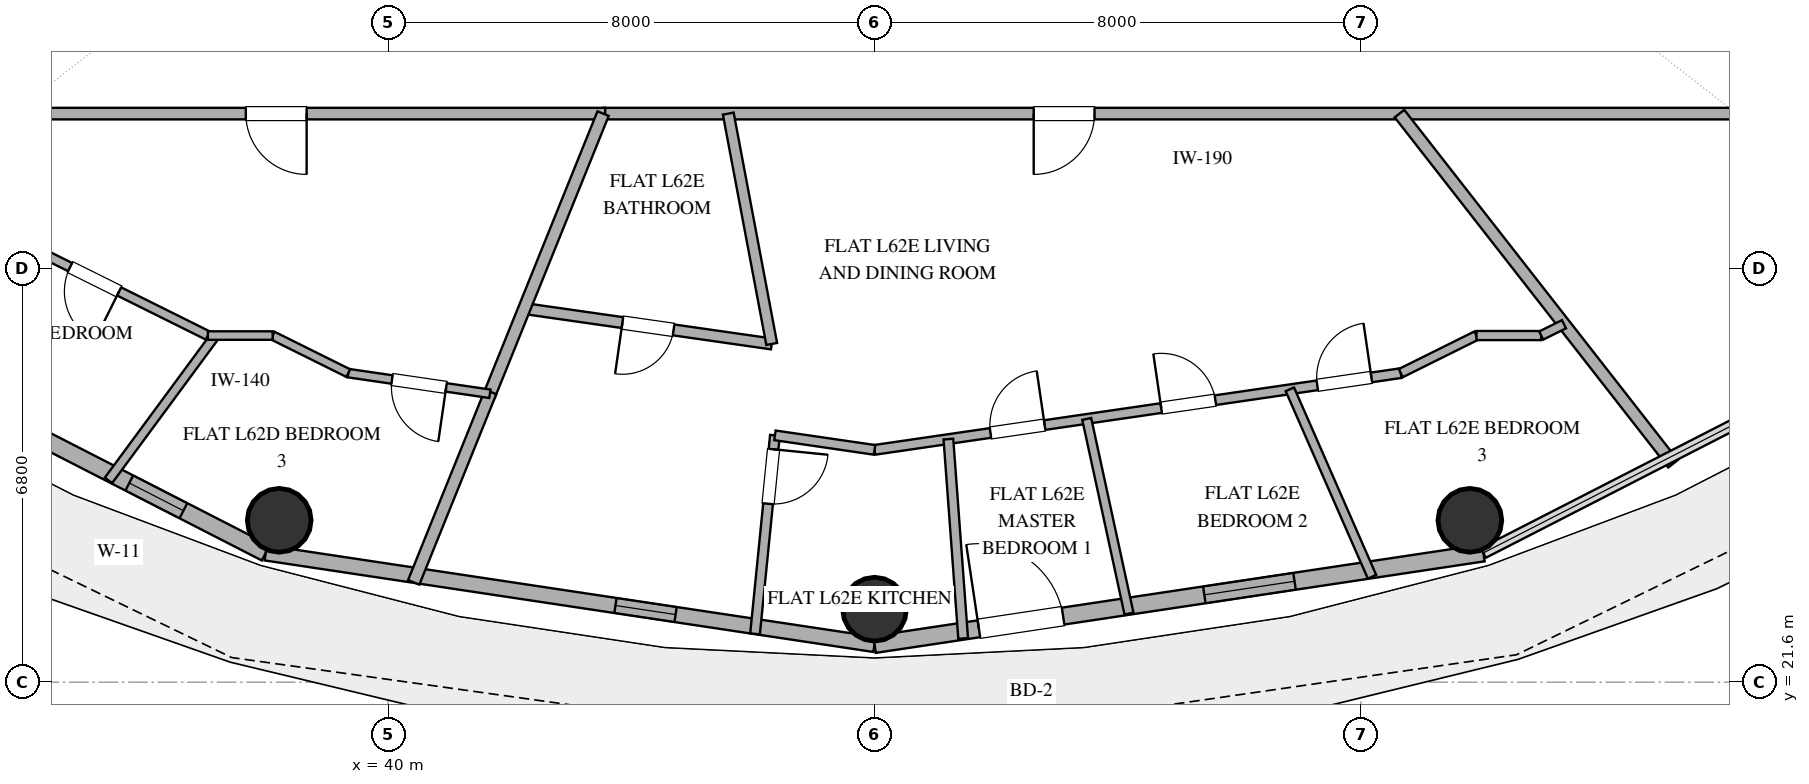
"""IFC4 building model, lengths in metres.
Left out: names, types, materials, properties, quantities, classifications, styles, units other than length and angle.
Written with IfcOpenShell. Run it as: python <this file> out.ifc"""

import sys

from ifc_helpers import new_model, si_unit, direction, frame, frame_2d, origin, origin_2d, place, context, subcontext, project, spatial, rectangle, hollow_circle, extrude, element, fill, save


model = new_model("IFC4")
c1 = context("Model", 3, precision=1e-05, world=origin(), true_north=direction((0.0, 1.0)))
c2 = subcontext(c1, "Body", "Model", "MODEL_VIEW")
j1 = project(units=[si_unit("LENGTHUNIT", "METRE"), si_unit("PLANEANGLEUNIT", "RADIAN")], contexts=[c1])
p1 = place(None, origin())
s1 = spatial("IfcSite", under=j1, at=p1, CompositionType="ELEMENT")
p2 = place(p1, origin())
s2 = spatial("IfcBuilding", under=s1, at=p2, CompositionType="ELEMENT")
p3 = place(p2, frame((0.0, 0.0, 242.4)))
s3 = spatial("IfcBuildingStorey", under=s2, at=p3, CompositionType="ELEMENT", Elevation=242.4)
for number, where, z_axis, x_axis in (
    (1, (38.209, 24.261, 0.0), (0.0, 0.0, 1.0), (1.0, 0.0, 0.0)),
    (2, (48.0, 22.8, 0.0), (0.0, 0.0, 1.0), (1.0, 0.0, 0.0)),
    (3, (57.791, 24.261, 0.0), (0.0, 0.0, 1.0), (1.0, 0.0, 0.0)),
):
    element("IfcColumn", number, at=place(p3, frame(where, z_axis=z_axis, x_axis=x_axis)), inside=s3, PredefinedType="COLUMN", context=c2, shape_type="SweptSolid", body=[
        extrude(hollow_circle(Radius=0.525, WallThickness=0.028, at=origin_2d()), origin(), (0.0, 0.0, 1.0), 3.36),
    ])
p4 = place(p3, frame((29.617, 28.013, 0.0), z_axis=(0.0, 0.0, 1.0), x_axis=(0.890007394051, -0.455946091699, 0.0)))
e4 = element("IfcWall", 4, at=p4, inside=s3, PredefinedType="SOLIDWALL", context=c2, shape_type="SweptSolid", body=[
    extrude(rectangle(XDim=9.404, YDim=0.28, at=frame_2d((4.702, 0.0))), origin(), (0.0, 0.0, 1.0), 3.36),
])
p5 = place(p4, frame((3.224, 0.0, 0.85)))
e5 = element("IfcOpeningElement", 5, at=p5, cuts=e4, PredefinedType="OPENING", context=c2, shape_type="SweptSolid", body=[
    extrude(rectangle(XDim=1.8, YDim=2.2, at=frame_2d((0.9, 1.1))), frame((0.0, 0.15, 0.0), z_axis=(0.0, -1.0, 0.0), x_axis=(1.0, 0.0, 0.0)), (0.0, 0.0, 1.0), 0.3),
])
p6 = place(p4, frame((6.883, 0.0, 0.85)))
e6 = element("IfcOpeningElement", 6, at=p6, cuts=e4, PredefinedType="OPENING", context=c2, shape_type="SweptSolid", body=[
    extrude(rectangle(XDim=1.0, YDim=1.8, at=frame_2d((0.5, 0.9))), frame((0.0, 0.15, 0.0), z_axis=(0.0, -1.0, 0.0), x_axis=(1.0, 0.0, 0.0)), (0.0, 0.0, 1.0), 0.3),
])
p7 = place(p3, frame((37.987, 23.726, 0.0), z_axis=(0.0, 0.0, 1.0), x_axis=(0.988882522213, -0.148698881169, 0.0)))
e7 = element("IfcWall", 7, at=p7, inside=s3, PredefinedType="SOLIDWALL", context=c2, shape_type="SweptSolid", body=[
    extrude(rectangle(XDim=10.125, YDim=0.25, at=frame_2d((5.062, 0.0))), origin(), (0.0, 0.0, 1.0), 3.36),
])
p8 = place(p7, frame((5.816, 0.0, 0.35)))
e8 = element("IfcOpeningElement", 8, at=p8, cuts=e7, PredefinedType="OPENING", context=c2, shape_type="SweptSolid", body=[
    extrude(rectangle(XDim=1.0, YDim=1.05, at=frame_2d((0.5, 0.525))), frame((0.0, 0.135, 0.0), z_axis=(0.0, -1.0, 0.0), x_axis=(1.0, 0.0, 0.0)), (0.0, 0.0, 1.0), 0.27),
])
p9 = place(p3, frame((48.0, 22.22, 0.0), z_axis=(0.0, 0.0, 1.0), x_axis=(0.988882522213, 0.148698881169, 0.0)))
e9 = element("IfcWall", 9, at=p9, inside=s3, PredefinedType="SOLIDWALL", context=c2, shape_type="SweptSolid", body=[
    extrude(rectangle(XDim=10.125, YDim=0.28, at=frame_2d((5.062, 0.0))), origin(), (0.0, 0.0, 1.0), 3.36),
])
p10 = place(p9, frame((1.736, 0.0, 0.0)))
e10 = element("IfcOpeningElement", 10, at=p10, cuts=e9, PredefinedType="OPENING", context=c2, shape_type="SweptSolid", body=[
    extrude(rectangle(XDim=1.4, YDim=2.2, at=frame_2d((0.7, 1.1))), frame((0.0, 0.15, 0.0), z_axis=(0.0, -1.0, 0.0), x_axis=(1.0, 0.0, 0.0)), (0.0, 0.0, 1.0), 0.3),
])
p11 = place(p9, frame((5.485, 0.0, 0.85)))
e11 = element("IfcOpeningElement", 11, at=p11, cuts=e9, PredefinedType="OPENING", context=c2, shape_type="SweptSolid", body=[
    extrude(rectangle(XDim=1.5, YDim=1.8, at=frame_2d((0.75, 0.9))), frame((0.0, 0.15, 0.0), z_axis=(0.0, -1.0, 0.0), x_axis=(1.0, 0.0, 0.0)), (0.0, 0.0, 1.0), 0.3),
])
p12 = place(p3, frame((63.25, 30.95, 0.0), z_axis=(0.0, 0.0, 1.0), x_axis=(-1.0, 0.0, 0.0)))
e12 = element("IfcWall", 12, at=p12, inside=s3, PredefinedType="PARTITIONING", context=c2, shape_type="SweptSolid", body=[
    extrude(rectangle(XDim=19.715, YDim=0.19, at=frame_2d((9.857, 0.0))), origin(), (0.0, 0.0, 1.0), 2.72),
])
p13 = place(p12, frame((11.632, 0.0, 0.0)))
e13 = element("IfcOpeningElement", 13, at=p13, cuts=e12, PredefinedType="OPENING", context=c2, shape_type="SweptSolid", body=[
    extrude(rectangle(XDim=1.0, YDim=2.2, at=frame_2d((0.5, 1.1))), frame((0.0, 0.105, 0.0), z_axis=(0.0, -1.0, 0.0), x_axis=(1.0, 0.0, 0.0)), (0.0, 0.0, 1.0), 0.21),
])
p14 = place(p3, frame((43.57, 30.95, 0.0), z_axis=(0.0, 0.0, 1.0), x_axis=(-1.0, 0.0, 0.0)))
e14 = element("IfcWall", 14, at=p14, inside=s3, PredefinedType="PARTITIONING", context=c2, shape_type="SweptSolid", body=[
    extrude(rectangle(XDim=10.82, YDim=0.19, at=frame_2d((5.41, 0.0))), origin(), (0.0, 0.0, 1.0), 2.72),
])
p15 = place(p14, frame((4.91, 0.0, 0.0)))
e15 = element("IfcOpeningElement", 15, at=p15, cuts=e14, PredefinedType="OPENING", context=c2, shape_type="SweptSolid", body=[
    extrude(rectangle(XDim=1.0, YDim=2.2, at=frame_2d((0.5, 1.1))), frame((0.0, 0.105, 0.0), z_axis=(0.0, -1.0, 0.0), x_axis=(1.0, 0.0, 0.0)), (0.0, 0.0, 1.0), 0.21),
])
p16 = place(p3, frame((56.633, 30.95, 0.0), z_axis=(0.0, 0.0, 1.0), x_axis=(0.615657656631, -0.788013737083, 0.0)))
e16 = element("IfcWall", 16, at=p16, inside=s3, PredefinedType="PARTITIONING", context=c2, shape_type="SweptSolid", body=[
    extrude(rectangle(XDim=7.308, YDim=0.2, at=frame_2d((3.654, 0.0))), origin(), (0.0, 0.0, 1.0), 2.72),
])
p17 = place(p3, frame((37.036, 27.3, 0.0), z_axis=(0.0, 0.0, 1.0), x_axis=(-0.895471406875, 0.445119039661, 0.0)))
e17 = element("IfcWall", 17, at=p17, inside=s3, PredefinedType="PARTITIONING", context=c2, shape_type="SweptSolid", body=[
    extrude(rectangle(XDim=5.971, YDim=0.15, at=frame_2d((2.986, 0.0))), origin(), (0.0, 0.0, 1.0), 2.72),
])
p18 = place(p17, frame((1.631, 0.0, 0.0)))
e18 = element("IfcOpeningElement", 18, at=p18, cuts=e17, PredefinedType="OPENING", context=c2, shape_type="SweptSolid", body=[
    extrude(rectangle(XDim=0.9, YDim=2.1, at=frame_2d((0.45, 1.05))), frame((0.0, 0.085, 0.0), z_axis=(0.0, -1.0, 0.0), x_axis=(1.0, 0.0, 0.0)), (0.0, 0.0, 1.0), 0.17),
])
p19 = place(p17, frame((4.582, 0.0, 0.0)))
e19 = element("IfcOpeningElement", 19, at=p19, cuts=e17, PredefinedType="OPENING", context=c2, shape_type="SweptSolid", body=[
    extrude(rectangle(XDim=0.9, YDim=2.1, at=frame_2d((0.45, 1.05))), frame((0.0, 0.085, 0.0), z_axis=(0.0, -1.0, 0.0), x_axis=(1.0, 0.0, 0.0)), (0.0, 0.0, 1.0), 0.17),
])
p20 = place(p3, frame((46.309, 27.162, 0.0), z_axis=(0.0, 0.0, 1.0), x_axis=(-0.989929285776, 0.141562739319, 0.0)))
e20 = element("IfcWall", 20, at=p20, inside=s3, PredefinedType="PLUMBINGWALL", context=c2, shape_type="SweptSolid", body=[
    extrude(rectangle(XDim=4.11, YDim=0.18, at=frame_2d((2.055, 0.0))), origin(), (0.0, 0.0, 1.0), 2.72),
])
p21 = place(p20, frame((1.63, 0.0, 0.0)))
e21 = element("IfcOpeningElement", 21, at=p21, cuts=e20, PredefinedType="OPENING", context=c2, shape_type="SweptSolid", body=[
    extrude(rectangle(XDim=0.85, YDim=2.1, at=frame_2d((0.425, 1.05))), frame((0.0, 0.1, 0.0), z_axis=(0.0, -1.0, 0.0), x_axis=(1.0, 0.0, 0.0)), (0.0, 0.0, 1.0), 0.2),
])
p22 = place(p3, frame((45.594, 30.95, 0.0), z_axis=(0.0, 0.0, 1.0), x_axis=(0.18532477331, -0.982677326694, 0.0)))
e22 = element("IfcWall", 22, at=p22, inside=s3, PredefinedType="PLUMBINGWALL", context=c2, shape_type="SweptSolid", body=[
    extrude(rectangle(XDim=3.854, YDim=0.18, at=frame_2d((1.927, 0.0))), origin(), (0.0, 0.0, 1.0), 2.72),
])
p23 = place(p3, frame((43.535, 30.95, 0.0), z_axis=(0.0, 0.0, 1.0), x_axis=(-0.374594584492, -0.927188706397, 0.0)))
e23 = element("IfcWall", 23, at=p23, inside=s3, PredefinedType="PARTITIONING", context=c2, shape_type="SweptSolid", body=[
    extrude(rectangle(XDim=5.002, YDim=0.2, at=frame_2d((2.501, 0.0))), origin(), (0.0, 0.0, 1.0), 2.72),
])
p24 = place(p3, frame((40.421, 23.242, 0.0), z_axis=(0.0, 0.0, 1.0), x_axis=(0.374604084458, 0.927184868248, 0.0)))
e24 = element("IfcWall", 24, at=p24, inside=s3, PredefinedType="PARTITIONING", context=c2, shape_type="SweptSolid", body=[
    extrude(rectangle(XDim=3.377, YDim=0.2, at=frame_2d((1.688, 0.0))), origin(), (0.0, 0.0, 1.0), 2.72),
])
p25 = place(p3, frame((48.0, 25.42, 0.0), z_axis=(0.0, 0.0, 1.0), x_axis=(0.989540121389, 0.144257922351, 0.0)))
e25 = element("IfcWall", 25, at=p25, inside=s3, PredefinedType="PLUMBINGWALL", context=c2, shape_type="SweptSolid", body=[
    extrude(rectangle(XDim=8.746, YDim=0.16, at=frame_2d((4.373, 0.0))), origin(), (0.0, 0.0, 1.0), 2.72),
])
p26 = place(p25, frame((4.765, 0.0, 0.0)))
e26 = element("IfcOpeningElement", 26, at=p26, cuts=e25, PredefinedType="OPENING", context=c2, shape_type="SweptSolid", body=[
    extrude(rectangle(XDim=0.9, YDim=2.1, at=frame_2d((0.45, 1.05))), frame((0.0, 0.09, 0.0), z_axis=(0.0, -1.0, 0.0), x_axis=(1.0, 0.0, 0.0)), (0.0, 0.0, 1.0), 0.18),
])
p27 = place(p25, frame((1.927, 0.0, 0.0)))
e27 = element("IfcOpeningElement", 27, at=p27, cuts=e25, PredefinedType="OPENING", context=c2, shape_type="SweptSolid", body=[
    extrude(rectangle(XDim=0.9, YDim=2.1, at=frame_2d((0.45, 1.05))), frame((0.0, 0.09, 0.0), z_axis=(0.0, -1.0, 0.0), x_axis=(1.0, 0.0, 0.0)), (0.0, 0.0, 1.0), 0.18),
])
p28 = place(p25, frame((7.358, 0.0, 0.0)))
e28 = element("IfcOpeningElement", 28, at=p28, cuts=e25, PredefinedType="OPENING", context=c2, shape_type="SweptSolid", body=[
    extrude(rectangle(XDim=0.9, YDim=2.1, at=frame_2d((0.45, 1.05))), frame((0.0, 0.09, 0.0), z_axis=(0.0, -1.0, 0.0), x_axis=(1.0, 0.0, 0.0)), (0.0, 0.0, 1.0), 0.18),
])
p29 = place(p3, frame((54.831, 26.416, 0.0), z_axis=(0.0, 0.0, 1.0), x_axis=(0.401469388376, -0.915872442099, 0.0)))
e29 = element("IfcWall", 29, at=p29, inside=s3, PredefinedType="PARTITIONING", context=c2, shape_type="SweptSolid", body=[
    extrude(rectangle(XDim=3.366, YDim=0.15, at=frame_2d((1.683, 0.0))), origin(), (0.0, 0.0, 1.0), 2.72),
])
p30 = place(p3, frame((49.458, 22.318, 0.0), z_axis=(0.0, 0.0, 1.0), x_axis=(-0.073879890619, 0.997267146637, 0.0)))
e30 = element("IfcWall", 30, at=p30, inside=s3, PredefinedType="PLUMBINGWALL", context=c2, shape_type="SweptSolid", body=[
    extrude(rectangle(XDim=3.288, YDim=0.16, at=frame_2d((1.644, 0.0))), origin(), (0.0, 0.0, 1.0), 2.72),
])
p31 = place(p3, frame((46.362, 25.659, 0.0), z_axis=(0.0, 0.0, 1.0), x_axis=(-0.099783673114, -0.995009155023, 0.0)))
e31 = element("IfcWall", 31, at=p31, inside=s3, PredefinedType="PLUMBINGWALL", context=c2, shape_type="SweptSolid", body=[
    extrude(rectangle(XDim=3.281, YDim=0.16, at=frame_2d((1.641, 0.0))), origin(), (0.0, 0.0, 1.0), 2.72),
])
p32 = place(p31, frame((0.23, 0.0, 0.0)))
e32 = element("IfcOpeningElement", 32, at=p32, cuts=e31, PredefinedType="OPENING", context=c2, shape_type="SweptSolid", body=[
    extrude(rectangle(XDim=0.9, YDim=2.1, at=frame_2d((0.45, 1.05))), frame((0.0, 0.09, 0.0), z_axis=(0.0, -1.0, 0.0), x_axis=(1.0, 0.0, 0.0)), (0.0, 0.0, 1.0), 0.18),
])
p33 = place(p3, frame((52.185, 22.728, 0.0), z_axis=(0.0, 0.0, 1.0), x_axis=(-0.212200652442, 0.977226116671, 0.0)))
e33 = element("IfcWall", 33, at=p33, inside=s3, PredefinedType="PARTITIONING", context=c2, shape_type="SweptSolid", body=[
    extrude(rectangle(XDim=3.276, YDim=0.15, at=frame_2d((1.638, 0.0))), origin(), (0.0, 0.0, 1.0), 2.72),
])
p34 = place(p3, frame((35.401, 24.918, 0.0), z_axis=(0.0, 0.0, 1.0), x_axis=(0.593567519028, 0.804784194897, 0.0)))
e34 = element("IfcWall", 34, at=p34, inside=s3, PredefinedType="PARTITIONING", context=c2, shape_type="SweptSolid", body=[
    extrude(rectangle(XDim=2.96, YDim=0.15, at=frame_2d((1.48, 0.0))), origin(), (0.0, 0.0, 1.0), 2.72),
])
p35 = place(p3, frame((41.674, 26.343, 0.0), z_axis=(0.0, 0.0, 1.0), x_axis=(-0.989532363779, 0.144311125814, 0.0)))
e35 = element("IfcWall", 35, at=p35, inside=s3, PredefinedType="PARTITIONING", context=c2, shape_type="SweptSolid", body=[
    extrude(rectangle(XDim=2.353, YDim=0.14, at=frame_2d((1.177, 0.0))), origin(), (0.0, 0.0, 1.0), 2.72),
])
p36 = place(p35, frame((0.727, 0.0, 0.0)))
e36 = element("IfcOpeningElement", 36, at=p36, cuts=e35, PredefinedType="OPENING", context=c2, shape_type="SweptSolid", body=[
    extrude(rectangle(XDim=0.9, YDim=2.1, at=frame_2d((0.45, 1.05))), frame((0.0, 0.08, 0.0), z_axis=(0.0, -1.0, 0.0), x_axis=(1.0, 0.0, 0.0)), (0.0, 0.0, 1.0), 0.16),
])
p37 = place(p3, frame((48.0, 25.42, 0.0), z_axis=(0.0, 0.0, 1.0), x_axis=(-0.989523327183, 0.144373075605, 0.0)))
e37 = element("IfcWall", 37, at=p37, inside=s3, PredefinedType="PLUMBINGWALL", context=c2, shape_type="SweptSolid", body=[
    extrude(rectangle(XDim=1.656, YDim=0.16, at=frame_2d((0.828, 0.0))), origin(), (0.0, 0.0, 1.0), 2.72),
])
p38 = place(p3, frame((39.345, 26.682, 0.0), z_axis=(0.0, 0.0, 1.0), x_axis=(-0.895584310315, 0.444891833053, 0.0)))
e38 = element("IfcWall", 38, at=p38, inside=s3, PredefinedType="PARTITIONING", context=c2, shape_type="SweptSolid", body=[
    extrude(rectangle(XDim=1.389, YDim=0.14, at=frame_2d((0.694, 0.0))), origin(), (0.0, 0.0, 1.0), 2.72),
])
p39 = place(p3, frame((57.899, 27.3, 0.0), z_axis=(0.0, 0.0, 1.0), x_axis=(-0.895584310315, -0.444891833053, 0.0)))
e39 = element("IfcWall", 39, at=p39, inside=s3, PredefinedType="PARTITIONING", context=c2, shape_type="SweptSolid", body=[
    extrude(rectangle(XDim=1.389, YDim=0.15, at=frame_2d((0.694, 0.0))), origin(), (0.0, 0.0, 1.0), 2.72),
])
p40 = place(p3, frame((58.964, 27.3, 0.0), z_axis=(0.0, 0.0, 1.0), x_axis=(-1.0, 0.0, 0.0)))
e40 = element("IfcWall", 40, at=p40, inside=s3, PredefinedType="PARTITIONING", context=c2, shape_type="SweptSolid", body=[
    extrude(rectangle(XDim=1.065, YDim=0.15, at=frame_2d((0.533, 0.0))), origin(), (0.0, 0.0, 1.0), 2.72),
])
p41 = place(p3, frame((38.101, 27.3, 0.0), z_axis=(0.0, 0.0, 1.0), x_axis=(-1.0, 0.0, 0.0)))
e41 = element("IfcWall", 41, at=p41, inside=s3, PredefinedType="PARTITIONING", context=c2, shape_type="SweptSolid", body=[
    extrude(rectangle(XDim=1.065, YDim=0.14, at=frame_2d((0.533, 0.0))), origin(), (0.0, 0.0, 1.0), 2.72),
])
p42 = place(p3, frame((59.339, 27.487, 0.0), z_axis=(0.0, 0.0, 1.0), x_axis=(-0.895473432012, -0.445114965554, 0.0)))
e42 = element("IfcWall", 42, at=p42, inside=s3, PredefinedType="PARTITIONING", context=c2, shape_type="SweptSolid", body=[
    extrude(rectangle(XDim=0.419, YDim=0.15, at=frame_2d((0.209, 0.0))), origin(), (0.0, 0.0, 1.0), 2.72),
])
p43 = place(p6, origin())
e43 = element("IfcWindow", 43, at=p43, inside=s3, PartitioningType="SINGLE_PANEL", PredefinedType="WINDOW", context=c2, shape_type="SweptSolid", body=[
    extrude(rectangle(XDim=1.0, YDim=1.8, at=frame_2d((0.5, 0.9))), frame((0.0, 0.03, 0.0), z_axis=(0.0, -1.0, 0.0), x_axis=(1.0, 0.0, 0.0)), (0.0, 0.0, 1.0), 0.06),
])
fill(e6, e43)
p44 = place(p10, origin())
e44 = element("IfcDoor", 44, at=p44, inside=s3, OperationType="SINGLE_SWING_LEFT", PredefinedType="DOOR", context=c2, shape_type="SweptSolid", body=[
    extrude(rectangle(XDim=1.4, YDim=2.2, at=frame_2d((0.7, 1.1))), frame((0.0, 0.025, 0.0), z_axis=(0.0, -1.0, 0.0), x_axis=(1.0, 0.0, 0.0)), (0.0, 0.0, 1.0), 0.05),
])
fill(e10, e44)
p45 = place(p11, origin())
e45 = element("IfcWindow", 45, at=p45, inside=s3, PartitioningType="SINGLE_PANEL", PredefinedType="WINDOW", context=c2, shape_type="SweptSolid", body=[
    extrude(rectangle(XDim=1.5, YDim=1.8, at=frame_2d((0.75, 0.9))), frame((0.0, 0.03, 0.0), z_axis=(0.0, -1.0, 0.0), x_axis=(1.0, 0.0, 0.0)), (0.0, 0.0, 1.0), 0.06),
])
fill(e11, e45)
p46 = place(p8, origin())
e46 = element("IfcWindow", 46, at=p46, inside=s3, PartitioningType="SINGLE_PANEL", PredefinedType="WINDOW", context=c2, shape_type="SweptSolid", body=[
    extrude(rectangle(XDim=1.0, YDim=1.05, at=frame_2d((0.5, 0.525))), frame((0.0, 0.03, 0.0), z_axis=(0.0, -1.0, 0.0), x_axis=(1.0, 0.0, 0.0)), (0.0, 0.0, 1.0), 0.06),
])
fill(e8, e46)
p47 = place(p13, origin())
e47 = element("IfcDoor", 47, at=p47, inside=s3, OperationType="SINGLE_SWING_RIGHT", PredefinedType="DOOR", context=c2, shape_type="SweptSolid", body=[
    extrude(rectangle(XDim=1.0, YDim=2.2, at=frame_2d((0.5, 1.1))), frame((0.0, 0.025, 0.0), z_axis=(0.0, -1.0, 0.0), x_axis=(1.0, 0.0, 0.0)), (0.0, 0.0, 1.0), 0.05),
])
fill(e13, e47)
p48 = place(p15, origin())
e48 = element("IfcDoor", 48, at=p48, inside=s3, OperationType="SINGLE_SWING_LEFT", PredefinedType="DOOR", context=c2, shape_type="SweptSolid", body=[
    extrude(rectangle(XDim=1.0, YDim=2.2, at=frame_2d((0.5, 1.1))), frame((0.0, 0.025, 0.0), z_axis=(0.0, -1.0, 0.0), x_axis=(1.0, 0.0, 0.0)), (0.0, 0.0, 1.0), 0.05),
])
fill(e15, e48)
p49 = place(p18, origin())
e49 = element("IfcDoor", 49, at=p49, inside=s3, OperationType="SINGLE_SWING_LEFT", PredefinedType="DOOR", context=c2, shape_type="SweptSolid", body=[
    extrude(rectangle(XDim=0.9, YDim=2.1, at=frame_2d((0.45, 1.05))), frame((0.0, 0.025, 0.0), z_axis=(0.0, -1.0, 0.0), x_axis=(1.0, 0.0, 0.0)), (0.0, 0.0, 1.0), 0.05),
])
fill(e18, e49)
p50 = place(p21, origin())
e50 = element("IfcDoor", 50, at=p50, inside=s3, OperationType="SINGLE_SWING_RIGHT", PredefinedType="DOOR", context=c2, shape_type="SweptSolid", body=[
    extrude(rectangle(XDim=0.85, YDim=2.1, at=frame_2d((0.425, 1.05))), frame((0.0, 0.025, 0.0), z_axis=(0.0, -1.0, 0.0), x_axis=(1.0, 0.0, 0.0)), (0.0, 0.0, 1.0), 0.05),
])
fill(e21, e50)
p51 = place(p26, origin())
e51 = element("IfcDoor", 51, at=p51, inside=s3, OperationType="SINGLE_SWING_LEFT", PredefinedType="DOOR", context=c2, shape_type="SweptSolid", body=[
    extrude(rectangle(XDim=0.9, YDim=2.1, at=frame_2d((0.45, 1.05))), frame((0.0, 0.025, 0.0), z_axis=(0.0, -1.0, 0.0), x_axis=(1.0, 0.0, 0.0)), (0.0, 0.0, 1.0), 0.05),
])
fill(e26, e51)
p52 = place(p27, origin())
e52 = element("IfcDoor", 52, at=p52, inside=s3, OperationType="SINGLE_SWING_RIGHT", PredefinedType="DOOR", context=c2, shape_type="SweptSolid", body=[
    extrude(rectangle(XDim=0.9, YDim=2.1, at=frame_2d((0.45, 1.05))), frame((0.0, 0.025, 0.0), z_axis=(0.0, -1.0, 0.0), x_axis=(1.0, 0.0, 0.0)), (0.0, 0.0, 1.0), 0.05),
])
fill(e27, e52)
p53 = place(p28, origin())
e53 = element("IfcDoor", 53, at=p53, inside=s3, OperationType="SINGLE_SWING_RIGHT", PredefinedType="DOOR", context=c2, shape_type="SweptSolid", body=[
    extrude(rectangle(XDim=0.9, YDim=2.1, at=frame_2d((0.45, 1.05))), frame((0.0, 0.025, 0.0), z_axis=(0.0, -1.0, 0.0), x_axis=(1.0, 0.0, 0.0)), (0.0, 0.0, 1.0), 0.05),
])
fill(e28, e53)
p54 = place(p32, origin())
e54 = element("IfcDoor", 54, at=p54, inside=s3, OperationType="SINGLE_SWING_LEFT", PredefinedType="DOOR", context=c2, shape_type="SweptSolid", body=[
    extrude(rectangle(XDim=0.9, YDim=2.1, at=frame_2d((0.45, 1.05))), frame((0.0, 0.025, 0.0), z_axis=(0.0, -1.0, 0.0), x_axis=(1.0, 0.0, 0.0)), (0.0, 0.0, 1.0), 0.05),
])
fill(e32, e54)
p55 = place(p36, origin())
e55 = element("IfcDoor", 55, at=p55, inside=s3, OperationType="SINGLE_SWING_LEFT", PredefinedType="DOOR", context=c2, shape_type="SweptSolid", body=[
    extrude(rectangle(XDim=0.9, YDim=2.1, at=frame_2d((0.45, 1.05))), frame((0.0, 0.025, 0.0), z_axis=(0.0, -1.0, 0.0), x_axis=(1.0, 0.0, 0.0)), (0.0, 0.0, 1.0), 0.05),
])
fill(e36, e55)
save(model, sys.argv[1])
